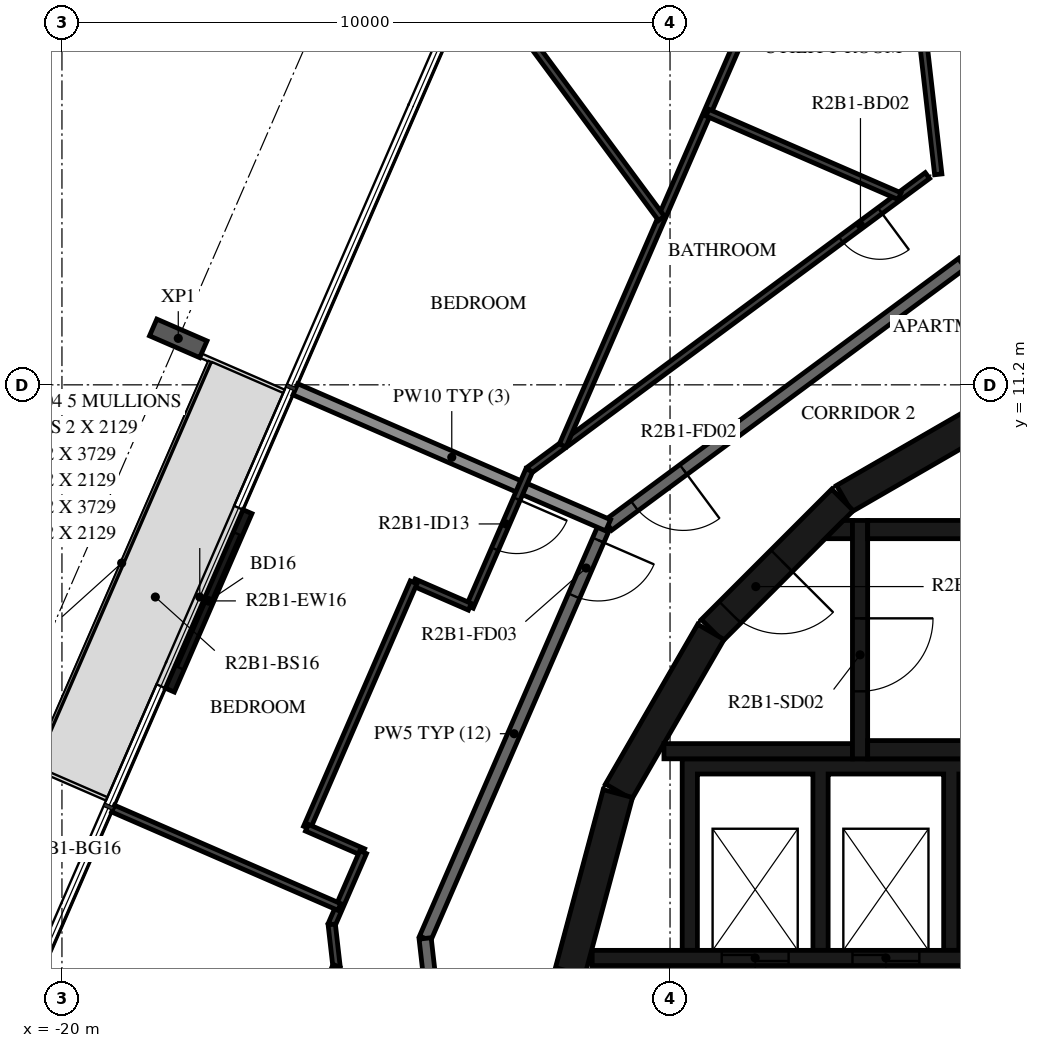
"""IFC4 building model, lengths in metres.
Left out: names, types, materials, properties, quantities, classifications, styles, units other than length and angle.
Written with IfcOpenShell. Run it as: python <this file> out.ifc"""

import sys

from ifc_helpers import new_model, si_unit, direction, frame, frame_2d, origin, origin_2d, place, context, subcontext, project, spatial, polyline, rectangle, i_section, outline, extrude, element, fill, save


model = new_model("IFC4")
c1 = context("Model", 3, precision=1e-05, world=origin(), true_north=direction((0.0, 1.0)))
c2 = subcontext(c1, "Body", "Model", "MODEL_VIEW")
j1 = project(units=[si_unit("LENGTHUNIT", "METRE"), si_unit("PLANEANGLEUNIT", "RADIAN")], contexts=[c1])
p1 = place(None, origin())
s1 = spatial("IfcSite", under=j1, at=p1, CompositionType="ELEMENT")
p2 = place(p1, origin())
s2 = spatial("IfcBuilding", under=s1, at=p2, CompositionType="ELEMENT")
p3 = place(p2, frame((0.0, 0.0, 87.2)))
s3 = spatial("IfcBuildingStorey", under=s2, at=p3, CompositionType="ELEMENT", Elevation=87.2)
p4 = place(p3, frame((-18.087, 11.964, -0.38), z_axis=(0.0, 0.0, 1.0), x_axis=(0.398749038162, 0.917060087761, 0.0)))
e1 = element("IfcColumn", 1, at=p4, inside=s3, PredefinedType="COLUMN", context=c2, shape_type="SweptSolid", body=[
    extrude(i_section(OverallWidth=0.3, OverallDepth=0.9, WebThickness=0.019, FlangeThickness=0.035, FilletRadius=0.03, at=origin_2d()), origin(), (0.0, 0.0, 1.0), 3.5),
])
p5 = place(p3, frame((-16.949, 9.114, 0.0), z_axis=(0.0, 0.0, 1.0), x_axis=(-0.398720531764, -0.917072482168, 0.0)))
e2 = element("IfcWall", 2, at=p5, inside=s3, PredefinedType="STANDARD", context=c2, shape_type="SweptSolid", body=[
    extrude(rectangle(XDim=3.2, YDim=0.16, at=frame_2d((1.6, 0.0))), origin(), (0.0, 0.0, 1.0), 3.12),
])
p6 = place(p5, frame((0.4, 0.0, 0.0)))
e3 = element("IfcOpeningElement", 3, at=p6, cuts=e2, PredefinedType="OPENING", context=c2, shape_type="SweptSolid", body=[
    extrude(rectangle(XDim=2.4, YDim=2.4, at=frame_2d((1.2, 1.2))), frame((0.0, 0.09, 0.0), z_axis=(0.0, -1.0, 0.0), x_axis=(1.0, 0.0, 0.0)), (0.0, 0.0, 1.0), 0.18),
])
p7 = place(p3, frame((-4.51, 10.845, 0.0), z_axis=(0.0, 0.0, 1.0), x_axis=(-0.865975092491, -0.500087131594, 0.0)))
e4 = element("IfcWall", 4, at=p7, inside=s3, PredefinedType="SHEAR", context=c2, shape_type="SweptSolid", body=[
    extrude(rectangle(XDim=3.033, YDim=0.5, at=frame_2d((1.516, 0.0))), origin(), (0.0, 0.0, 1.0), 3.12),
])
p8 = place(p3, frame((-7.164, 9.308, 0.0), z_axis=(0.0, 0.0, 1.0), x_axis=(-0.707106781187, -0.707106781187, 0.0)))
e5 = element("IfcWall", 5, at=p8, inside=s3, PredefinedType="SHEAR", context=c2, shape_type="SweptSolid", body=[
    extrude(rectangle(XDim=3.032, YDim=0.5, at=frame_2d((1.516, 0.0))), origin(), (0.0, 0.0, 1.0), 3.12),
])
p9 = place(p8, frame((1.416, 0.0, 0.0)))
e6 = element("IfcOpeningElement", 6, at=p9, cuts=e5, PredefinedType="OPENING", context=c2, shape_type="SweptSolid", body=[
    extrude(rectangle(XDim=1.2, YDim=2.1, at=frame_2d((0.6, 1.05))), frame((0.0, 0.26, 0.0), z_axis=(0.0, -1.0, 0.0), x_axis=(1.0, 0.0, 0.0)), (0.0, 0.0, 1.0), 0.52),
])
for number, where, z_axis, x_axis in (
    (7, (-9.329, 7.137, 0.0), (0.0, 0.0, 1.0), (-0.5, -0.866, 0.0)),
    (8, (-10.858, 4.479, 0.0), (0.0, 0.0, 1.0), (-0.259, -0.966, 0.0)),
):
    element("IfcWall", number, at=place(p3, frame(where, z_axis=z_axis, x_axis=x_axis)), inside=s3, PredefinedType="SHEAR", context=c2, shape_type="SweptSolid", body=[
        extrude(rectangle(XDim=3.033, YDim=0.5, at=frame_2d((1.516, 0.0))), origin(), (0.0, 0.0, 1.0), 3.12),
    ])
for number, where, z_axis, x_axis in (
    (9, (-6.75, 5.2, 0.0), (0.0, 0.0, 1.0), (1.0, 0.0, 0.0)),
    (10, (-6.75, 8.82, 0.0), (0.0, 0.0, 1.0), (1.0, 0.0, 0.0)),
):
    element("IfcWall", number, at=place(p3, frame(where, z_axis=z_axis, x_axis=x_axis)), inside=s3, PredefinedType="SHEAR", context=c2, shape_type="SweptSolid", body=[
        extrude(rectangle(XDim=6.75, YDim=0.3, at=frame_2d((3.375, 0.0))), origin(), (0.0, 0.0, 1.0), 3.12),
    ])
p10 = place(p3, frame((-6.875, 8.97, 0.0), z_axis=(0.0, 0.0, 1.0), x_axis=(0.0, -1.0, 0.0)))
e11 = element("IfcWall", 11, at=p10, inside=s3, PredefinedType="SHEAR", context=c2, shape_type="SweptSolid", body=[
    extrude(rectangle(XDim=3.92, YDim=0.25, at=frame_2d((1.96, 0.0))), origin(), (0.0, 0.0, 1.0), 3.12),
])
p11 = place(p10, frame((1.61, 0.0, 0.0)))
e12 = element("IfcOpeningElement", 12, at=p11, cuts=e11, PredefinedType="OPENING", context=c2, shape_type="SweptSolid", body=[
    extrude(rectangle(XDim=1.2, YDim=2.1, at=frame_2d((0.6, 1.05))), frame((0.0, 0.135, 0.0), z_axis=(0.0, -1.0, 0.0), x_axis=(1.0, 0.0, 0.0)), (0.0, 0.0, 1.0), 0.27),
])
p12 = place(p3, frame((-7.0, 5.175, 0.0), z_axis=(0.0, 0.0, 1.0), x_axis=(-1.0, 0.0, 0.0)))
e13 = element("IfcWall", 13, at=p12, inside=s3, PredefinedType="SHEAR", context=c2, shape_type="SweptSolid", body=[
    extrude(rectangle(XDim=3.1, YDim=0.25, at=frame_2d((1.55, 0.0))), origin(), (0.0, 0.0, 1.0), 3.12),
])
p13 = place(p3, origin())
e14 = element("IfcWall", 14, at=p13, inside=s3, PredefinedType="SHEAR", context=c2, shape_type="SweptSolid", body=[
    extrude(outline(polyline([(-7.148, 8.97), (-7.0, 8.97), (-7.0, 8.67), (-7.448, 8.67), (-7.148, 8.97)])), origin(), (0.0, 0.0, 1.0), 3.12),
])
p14 = place(p3, origin())
e15 = element("IfcWall", 15, at=p14, inside=s3, PredefinedType="SHEAR", context=c2, shape_type="SweptSolid", body=[
    extrude(outline(polyline([(-9.55, 4.8), (-7.65, 4.8), (-7.65, 1.9), (-7.4, 1.9), (-7.4, 4.8), (-5.5, 4.8), (-5.5, 1.9), (-5.25, 1.9), (-5.25, 4.8), (-3.35, 4.8), (-3.35, 1.9), (-3.1, 1.9), (-3.1, 4.8), (-1.2, 4.8), (-1.2, 1.9), (-0.95, 1.9), (-0.95, 4.8), (0.95, 4.8), (0.95, 1.9), (1.2, 1.9), (1.2, 4.8), (3.1, 4.8), (3.1, 1.9), (3.35, 1.9), (3.35, 4.8), (5.25, 4.8), (5.25, 1.9), (5.5, 1.9), (5.5, 4.8), (7.4, 4.8), (7.4, 1.9), (7.65, 1.9), (7.65, 4.8), (9.55, 4.8), (9.55, 1.9), (9.8, 1.9), (9.8, 4.8), (9.8, 5.05), (-9.8, 5.05), (-9.8, 4.8), (-9.8, 1.9), (-9.55, 1.9), (-9.55, 4.8)])), origin(), (0.0, 0.0, 1.0), 3.12),
])
p15 = place(p3, frame((-11.28, 1.775, 0.0), z_axis=(0.0, 0.0, 1.0), x_axis=(1.0, 0.0, 0.0)))
e16 = element("IfcWall", 16, at=p15, inside=s3, PredefinedType="SHEAR", context=c2, shape_type="SweptSolid", body=[
    extrude(rectangle(XDim=14.38, YDim=0.25, at=frame_2d((7.19, 0.0))), origin(), (0.0, 0.0, 1.0), 3.12),
])
p16 = place(p15, frame((2.13, 0.0, 0.0)))
e17 = element("IfcOpeningElement", 17, at=p16, cuts=e16, PredefinedType="OPENING", context=c2, shape_type="SweptSolid", body=[
    extrude(rectangle(XDim=1.1, YDim=2.1, at=frame_2d((0.55, 1.05))), frame((0.0, 0.135, 0.0), z_axis=(0.0, -1.0, 0.0), x_axis=(1.0, 0.0, 0.0)), (0.0, 0.0, 1.0), 0.27),
])
p17 = place(p15, frame((4.28, 0.0, 0.0)))
e18 = element("IfcOpeningElement", 18, at=p17, cuts=e16, PredefinedType="OPENING", context=c2, shape_type="SweptSolid", body=[
    extrude(rectangle(XDim=1.1, YDim=2.1, at=frame_2d((0.55, 1.05))), frame((0.0, 0.135, 0.0), z_axis=(0.0, -1.0, 0.0), x_axis=(1.0, 0.0, 0.0)), (0.0, 0.0, 1.0), 0.27),
])
p18 = place(p15, frame((6.43, 0.0, 0.0)))
e19 = element("IfcOpeningElement", 19, at=p18, cuts=e16, PredefinedType="OPENING", context=c2, shape_type="SweptSolid", body=[
    extrude(rectangle(XDim=1.1, YDim=2.1, at=frame_2d((0.55, 1.05))), frame((0.0, 0.135, 0.0), z_axis=(0.0, -1.0, 0.0), x_axis=(1.0, 0.0, 0.0)), (0.0, 0.0, 1.0), 0.27),
])
p19 = place(p15, frame((8.58, 0.0, 0.0)))
e20 = element("IfcOpeningElement", 20, at=p19, cuts=e16, PredefinedType="OPENING", context=c2, shape_type="SweptSolid", body=[
    extrude(rectangle(XDim=1.1, YDim=2.1, at=frame_2d((0.55, 1.05))), frame((0.0, 0.135, 0.0), z_axis=(0.0, -1.0, 0.0), x_axis=(1.0, 0.0, 0.0)), (0.0, 0.0, 1.0), 0.27),
])
p20 = place(p15, frame((10.83, 0.0, 0.0)))
e21 = element("IfcOpeningElement", 21, at=p20, cuts=e16, PredefinedType="OPENING", context=c2, shape_type="SweptSolid", body=[
    extrude(rectangle(XDim=0.9, YDim=2.1, at=frame_2d((0.45, 1.05))), frame((0.0, 0.135, 0.0), z_axis=(0.0, -1.0, 0.0), x_axis=(1.0, 0.0, 0.0)), (0.0, 0.0, 1.0), 0.27),
])
p21 = place(p15, frame((12.98, 0.0, 0.0)))
e22 = element("IfcOpeningElement", 22, at=p21, cuts=e16, PredefinedType="OPENING", context=c2, shape_type="SweptSolid", body=[
    extrude(rectangle(XDim=0.9, YDim=2.1, at=frame_2d((0.45, 1.05))), frame((0.0, 0.135, 0.0), z_axis=(0.0, -1.0, 0.0), x_axis=(1.0, 0.0, 0.0)), (0.0, 0.0, 1.0), 0.27),
])
p22 = place(p3, frame((-5.198, 13.196, 0.0), z_axis=(0.0, 0.0, 1.0), x_axis=(-0.803864151363, -0.594812933748, 0.0)))
e23 = element("IfcWall", 23, at=p22, inside=s3, PredefinedType="STANDARD", context=c2, shape_type="SweptSolid", body=[
    extrude(rectangle(XDim=7.24, YDim=0.2, at=frame_2d((3.62, 0.0))), origin(), (0.0, 0.0, 1.0), 3.12),
])
p23 = place(p22, frame((5.7, 0.0, 0.0)))
e24 = element("IfcOpeningElement", 24, at=p23, cuts=e23, PredefinedType="OPENING", context=c2, shape_type="SweptSolid", body=[
    extrude(rectangle(XDim=1.0, YDim=2.1, at=frame_2d((0.5, 1.05))), frame((0.0, 0.11, 0.0), z_axis=(0.0, -1.0, 0.0), x_axis=(1.0, 0.0, 0.0)), (0.0, 0.0, 1.0), 0.22),
])
p24 = place(p3, frame((-11.1, 8.829, 0.0), z_axis=(0.0, 0.0, 1.0), x_axis=(-0.398741918631, -0.917063183388, 0.0)))
e25 = element("IfcWall", 25, at=p24, inside=s3, PredefinedType="STANDARD", context=c2, shape_type="SweptSolid", body=[
    extrude(rectangle(XDim=7.342, YDim=0.2, at=frame_2d((3.671, 0.0))), origin(), (0.0, 0.0, 1.0), 3.12),
])
p25 = place(p24, frame((0.2, 0.0, 0.0)))
e26 = element("IfcOpeningElement", 26, at=p25, cuts=e25, PredefinedType="OPENING", context=c2, shape_type="SweptSolid", body=[
    extrude(rectangle(XDim=1.0, YDim=2.1, at=frame_2d((0.5, 1.05))), frame((0.0, 0.11, 0.0), z_axis=(0.0, -1.0, 0.0), x_axis=(1.0, 0.0, 0.0)), (0.0, 0.0, 1.0), 0.22),
])
p26 = place(p3, frame((-14.028, 2.096, 0.0), z_axis=(0.0, 0.0, 1.0), x_axis=(0.113226782163, -0.993569170114, 0.0)))
e27 = element("IfcWall", 27, at=p26, inside=s3, PredefinedType="STANDARD", context=c2, shape_type="SweptSolid", body=[
    extrude(rectangle(XDim=7.342, YDim=0.2, at=frame_2d((3.671, 0.0))), origin(), (0.0, 0.0, 1.0), 3.12),
])
p27 = place(p3, frame((-16.161, 11.126, 0.0), z_axis=(0.0, 0.0, 1.0), x_axis=(0.917063135481, -0.398742028813, 0.0)))
e28 = element("IfcWall", 28, at=p27, inside=s3, PredefinedType="STANDARD", context=c2, shape_type="SweptSolid", body=[
    extrude(rectangle(XDim=5.608, YDim=0.2, at=frame_2d((2.804, 0.0))), origin(), (0.0, 0.0, 1.0), 2.73),
])
p28 = place(p3, frame((-6.042, 18.644, 0.0), z_axis=(0.0, 0.0, 1.0), x_axis=(0.113185787648, -0.993573840977, 0.0)))
e29 = element("IfcWall", 29, at=p28, inside=s3, PredefinedType="PARTITIONING", context=c2, shape_type="SweptSolid", body=[
    extrude(rectangle(XDim=4.008, YDim=0.12, at=frame_2d((2.004, 0.0))), origin(), (0.0, 0.0, 1.0), 3.12),
])
p29 = place(p3, frame((-5.767, 14.641, 0.0), z_axis=(0.0, 0.0, 1.0), x_axis=(-0.803853364238, -0.594827511807, 0.0)))
e30 = element("IfcWall", 30, at=p29, inside=s3, PredefinedType="PARTITIONING", context=c2, shape_type="SweptSolid", body=[
    extrude(rectangle(XDim=8.146, YDim=0.12, at=frame_2d((4.073, 0.0))), origin(), (0.0, 0.0, 1.0), 3.12),
])
p30 = place(p29, frame((0.97, 0.0, 0.0)))
e31 = element("IfcOpeningElement", 31, at=p30, cuts=e30, PredefinedType="OPENING", context=c2, shape_type="SweptSolid", body=[
    extrude(rectangle(XDim=0.8, YDim=2.1, at=frame_2d((0.4, 1.05))), frame((0.0, 0.07, 0.0), z_axis=(0.0, -1.0, 0.0), x_axis=(1.0, 0.0, 0.0)), (0.0, 0.0, 1.0), 0.14),
])
p31 = place(p3, frame((-12.315, 9.796, 0.0), z_axis=(0.0, 0.0, 1.0), x_axis=(-0.398762563957, -0.91705420646, 0.0)))
e32 = element("IfcWall", 32, at=p31, inside=s3, PredefinedType="PARTITIONING", context=c2, shape_type="SweptSolid", body=[
    extrude(rectangle(XDim=2.449, YDim=0.12, at=frame_2d((1.225, 0.0))), origin(), (0.0, 0.0, 1.0), 3.12),
])
p32 = place(p31, frame((0.513, 0.0, 0.0)))
e33 = element("IfcOpeningElement", 33, at=p32, cuts=e32, PredefinedType="OPENING", context=c2, shape_type="SweptSolid", body=[
    extrude(rectangle(XDim=0.9, YDim=2.1, at=frame_2d((0.45, 1.05))), frame((0.0, 0.07, 0.0), z_axis=(0.0, -1.0, 0.0), x_axis=(1.0, 0.0, 0.0)), (0.0, 0.0, 1.0), 0.14),
])
p33 = place(p3, frame((-5.952, 23.571, 0.0), z_axis=(0.0, 0.0, 1.0), x_axis=(-0.398745097158, -0.917061801348, 0.0)))
e34 = element("IfcWall", 34, at=p33, inside=s3, PredefinedType="PARTITIONING", context=c2, shape_type="SweptSolid", body=[
    extrude(rectangle(XDim=14.576, YDim=0.12, at=frame_2d((7.288, 0.0))), origin(), (0.0, 0.0, 1.0), 3.12),
])
p34 = place(p33, frame((3.201, 0.0, 0.0)))
e35 = element("IfcOpeningElement", 35, at=p34, cuts=e34, PredefinedType="OPENING", context=c2, shape_type="SweptSolid", body=[
    extrude(rectangle(XDim=0.9, YDim=2.1, at=frame_2d((0.45, 1.05))), frame((0.0, 0.07, 0.0), z_axis=(0.0, -1.0, 0.0), x_axis=(1.0, 0.0, 0.0)), (0.0, 0.0, 1.0), 0.14),
])
p35 = place(p33, frame((0.2, 0.0, 0.0)))
e36 = element("IfcOpeningElement", 36, at=p35, cuts=e34, PredefinedType="OPENING", context=c2, shape_type="SweptSolid", body=[
    extrude(rectangle(XDim=0.9, YDim=2.1, at=frame_2d((0.45, 1.05))), frame((0.0, 0.07, 0.0), z_axis=(0.0, -1.0, 0.0), x_axis=(1.0, 0.0, 0.0)), (0.0, 0.0, 1.0), 0.14),
])
p36 = place(p3, frame((-9.385, 15.676, 0.0), z_axis=(0.0, 0.0, 1.0), x_axis=(0.917068929701, -0.398728702475, 0.0)))
e37 = element("IfcWall", 37, at=p36, inside=s3, PredefinedType="PARTITIONING", context=c2, shape_type="SweptSolid", body=[
    extrude(rectangle(XDim=3.445, YDim=0.12, at=frame_2d((1.723, 0.0))), origin(), (0.0, 0.0, 1.0), 3.12),
])
p37 = place(p3, frame((-13.163, 18.022, 0.0), z_axis=(0.0, 0.0, 1.0), x_axis=(0.594797671626, -0.803875444226, 0.0)))
e38 = element("IfcWall", 38, at=p37, inside=s3, PredefinedType="PARTITIONING", context=c2, shape_type="SweptSolid", body=[
    extrude(rectangle(XDim=5.081, YDim=0.12, at=frame_2d((2.54, 0.0))), origin(), (0.0, 0.0, 1.0), 3.12),
])
p38 = place(p37, frame((0.4, 0.0, 0.0)))
e39 = element("IfcOpeningElement", 39, at=p38, cuts=e38, PredefinedType="OPENING", context=c2, shape_type="SweptSolid", body=[
    extrude(rectangle(XDim=0.9, YDim=2.1, at=frame_2d((0.45, 1.05))), frame((0.0, 0.07, 0.0), z_axis=(0.0, -1.0, 0.0), x_axis=(1.0, 0.0, 0.0)), (0.0, 0.0, 1.0), 0.14),
])
p39 = place(p3, frame((-13.292, 7.55, 0.0), z_axis=(0.0, 0.0, 1.0), x_axis=(-0.917016180017, 0.398850003871, 0.0)))
e40 = element("IfcWall", 40, at=p39, inside=s3, PredefinedType="PARTITIONING", context=c2, shape_type="SweptSolid", body=[
    extrude(rectangle(XDim=1.009, YDim=0.12, at=frame_2d((0.504, 0.0))), origin(), (0.0, 0.0, 1.0), 3.12),
])
p40 = place(p3, frame((-14.217, 7.952, 0.0), z_axis=(0.0, 0.0, 1.0), x_axis=(-0.398722053614, -0.917071820503, 0.0)))
e41 = element("IfcWall", 41, at=p40, inside=s3, PredefinedType="PARTITIONING", context=c2, shape_type="SweptSolid", body=[
    extrude(rectangle(XDim=4.4, YDim=0.12, at=frame_2d((2.2, 0.0))), origin(), (0.0, 0.0, 1.0), 3.12),
])
p41 = place(p3, frame((-15.971, 3.917, 0.0), z_axis=(0.0, 0.0, 1.0), x_axis=(0.916977666233, -0.39893854117, 0.0)))
e42 = element("IfcWall", 42, at=p41, inside=s3, PredefinedType="PARTITIONING", context=c2, shape_type="SweptSolid", body=[
    extrude(rectangle(XDim=1.009, YDim=0.12, at=frame_2d((0.504, 0.0))), origin(), (0.0, 0.0, 1.0), 3.12),
])
p42 = place(p3, frame((-15.046, 3.515, 0.0), z_axis=(0.0, 0.0, 1.0), x_axis=(-0.398664137006, -0.917096999158, 0.0)))
e43 = element("IfcWall", 43, at=p42, inside=s3, PredefinedType="PARTITIONING", context=c2, shape_type="SweptSolid", body=[
    extrude(rectangle(XDim=1.296, YDim=0.12, at=frame_2d((0.648, 0.0))), origin(), (0.0, 0.0, 1.0), 3.12),
])
p43 = place(p3, frame((-15.563, 2.326, 0.0), z_axis=(0.0, 0.0, 1.0), x_axis=(0.113175769889, -0.993574982128, 0.0)))
e44 = element("IfcWall", 44, at=p43, inside=s3, PredefinedType="PARTITIONING", context=c2, shape_type="SweptSolid", body=[
    extrude(rectangle(XDim=7.576, YDim=0.12, at=frame_2d((3.788, 0.0))), origin(), (0.0, 0.0, 1.0), 3.12),
])
p44 = place(p43, frame((2.185, 0.0, 0.0)))
e45 = element("IfcOpeningElement", 45, at=p44, cuts=e44, PredefinedType="OPENING", context=c2, shape_type="SweptSolid", body=[
    extrude(rectangle(XDim=0.8, YDim=2.1, at=frame_2d((0.4, 1.05))), frame((0.0, 0.07, 0.0), z_axis=(0.0, -1.0, 0.0), x_axis=(1.0, 0.0, 0.0)), (0.0, 0.0, 1.0), 0.14),
])
p45 = place(p3, frame((-19.159, 4.231, 0.0), z_axis=(0.0, 0.0, 1.0), x_axis=(0.91704996524, -0.398772317562, 0.0)))
e46 = element("IfcWall", 46, at=p45, inside=s3, PredefinedType="PARTITIONING", context=c2, shape_type="SweptSolid", body=[
    extrude(rectangle(XDim=4.057, YDim=0.12, at=frame_2d((2.029, 0.0))), origin(), (0.0, 0.0, 1.0), 2.73),
])
p46 = place(p3, frame((-17.109, -2.089, 0.0), z_axis=(0.0, 0.0, 1.0), x_axis=(0.398726111414, 0.917070056253, 0.0)))
e47 = element("IfcWall", 47, at=p46, inside=s3, PredefinedType="PARTITIONING", context=c2, shape_type="SweptSolid", body=[
    extrude(rectangle(XDim=4.072, YDim=0.12, at=frame_2d((2.036, 0.0))), origin(), (0.0, 0.0, 1.0), 3.12),
])
p47 = place(p6, origin())
e48 = element("IfcDoor", 48, at=p47, inside=s3, OperationType="DOUBLE_DOOR_SLIDING", PredefinedType="DOOR", context=c2, shape_type="SweptSolid", body=[
    extrude(rectangle(XDim=2.4, YDim=2.4, at=frame_2d((1.2, 1.2))), frame((0.0, 0.025, 0.0), z_axis=(0.0, -1.0, 0.0), x_axis=(1.0, 0.0, 0.0)), (0.0, 0.0, 1.0), 0.05),
])
fill(e3, e48)
p48 = place(p11, origin())
e49 = element("IfcDoor", 49, at=p48, inside=s3, OperationType="SINGLE_SWING_LEFT", PredefinedType="DOOR", context=c2, shape_type="SweptSolid", body=[
    extrude(rectangle(XDim=1.2, YDim=2.1, at=frame_2d((0.6, 1.05))), frame((0.0, 0.025, 0.0), z_axis=(0.0, -1.0, 0.0), x_axis=(1.0, 0.0, 0.0)), (0.0, 0.0, 1.0), 0.05),
])
fill(e12, e49)
p49 = place(p9, origin())
e50 = element("IfcDoor", 50, at=p49, inside=s3, OperationType="SINGLE_SWING_RIGHT", PredefinedType="DOOR", context=c2, shape_type="SweptSolid", body=[
    extrude(rectangle(XDim=1.2, YDim=2.1, at=frame_2d((0.6, 1.05))), frame((0.0, 0.025, 0.0), z_axis=(0.0, -1.0, 0.0), x_axis=(1.0, 0.0, 0.0)), (0.0, 0.0, 1.0), 0.05),
])
fill(e6, e50)
p50 = place(p16, origin())
e51 = element("IfcDoor", 51, at=p50, inside=s3, OperationType="DOUBLE_DOOR_SLIDING", PredefinedType="DOOR", context=c2, shape_type="SweptSolid", body=[
    extrude(rectangle(XDim=1.1, YDim=2.1, at=frame_2d((0.55, 1.05))), frame((0.0, 0.025, 0.0), z_axis=(0.0, -1.0, 0.0), x_axis=(1.0, 0.0, 0.0)), (0.0, 0.0, 1.0), 0.05),
])
fill(e17, e51)
p51 = place(p17, origin())
e52 = element("IfcDoor", 52, at=p51, inside=s3, OperationType="DOUBLE_DOOR_SLIDING", PredefinedType="DOOR", context=c2, shape_type="SweptSolid", body=[
    extrude(rectangle(XDim=1.1, YDim=2.1, at=frame_2d((0.55, 1.05))), frame((0.0, 0.025, 0.0), z_axis=(0.0, -1.0, 0.0), x_axis=(1.0, 0.0, 0.0)), (0.0, 0.0, 1.0), 0.05),
])
fill(e18, e52)
p52 = place(p23, origin())
e53 = element("IfcDoor", 53, at=p52, inside=s3, OperationType="SINGLE_SWING_LEFT", PredefinedType="DOOR", context=c2, shape_type="SweptSolid", body=[
    extrude(rectangle(XDim=1.0, YDim=2.1, at=frame_2d((0.5, 1.05))), frame((0.0, 0.025, 0.0), z_axis=(0.0, -1.0, 0.0), x_axis=(1.0, 0.0, 0.0)), (0.0, 0.0, 1.0), 0.05),
])
fill(e24, e53)
p53 = place(p30, origin())
e54 = element("IfcDoor", 54, at=p53, inside=s3, OperationType="SINGLE_SWING_LEFT", PredefinedType="DOOR", context=c2, shape_type="SweptSolid", body=[
    extrude(rectangle(XDim=0.8, YDim=2.1, at=frame_2d((0.4, 1.05))), frame((0.0, 0.025, 0.0), z_axis=(0.0, -1.0, 0.0), x_axis=(1.0, 0.0, 0.0)), (0.0, 0.0, 1.0), 0.05),
])
fill(e31, e54)
p54 = place(p25, origin())
e55 = element("IfcDoor", 55, at=p54, inside=s3, OperationType="SINGLE_SWING_LEFT", PredefinedType="DOOR", context=c2, shape_type="SweptSolid", body=[
    extrude(rectangle(XDim=1.0, YDim=2.1, at=frame_2d((0.5, 1.05))), frame((0.0, 0.025, 0.0), z_axis=(0.0, -1.0, 0.0), x_axis=(1.0, 0.0, 0.0)), (0.0, 0.0, 1.0), 0.05),
])
fill(e26, e55)
p55 = place(p32, origin())
e56 = element("IfcDoor", 56, at=p55, inside=s3, OperationType="SINGLE_SWING_LEFT", PredefinedType="DOOR", context=c2, shape_type="SweptSolid", body=[
    extrude(rectangle(XDim=0.9, YDim=2.1, at=frame_2d((0.45, 1.05))), frame((0.0, 0.025, 0.0), z_axis=(0.0, -1.0, 0.0), x_axis=(1.0, 0.0, 0.0)), (0.0, 0.0, 1.0), 0.05),
])
fill(e33, e56)
save(model, sys.argv[1])
